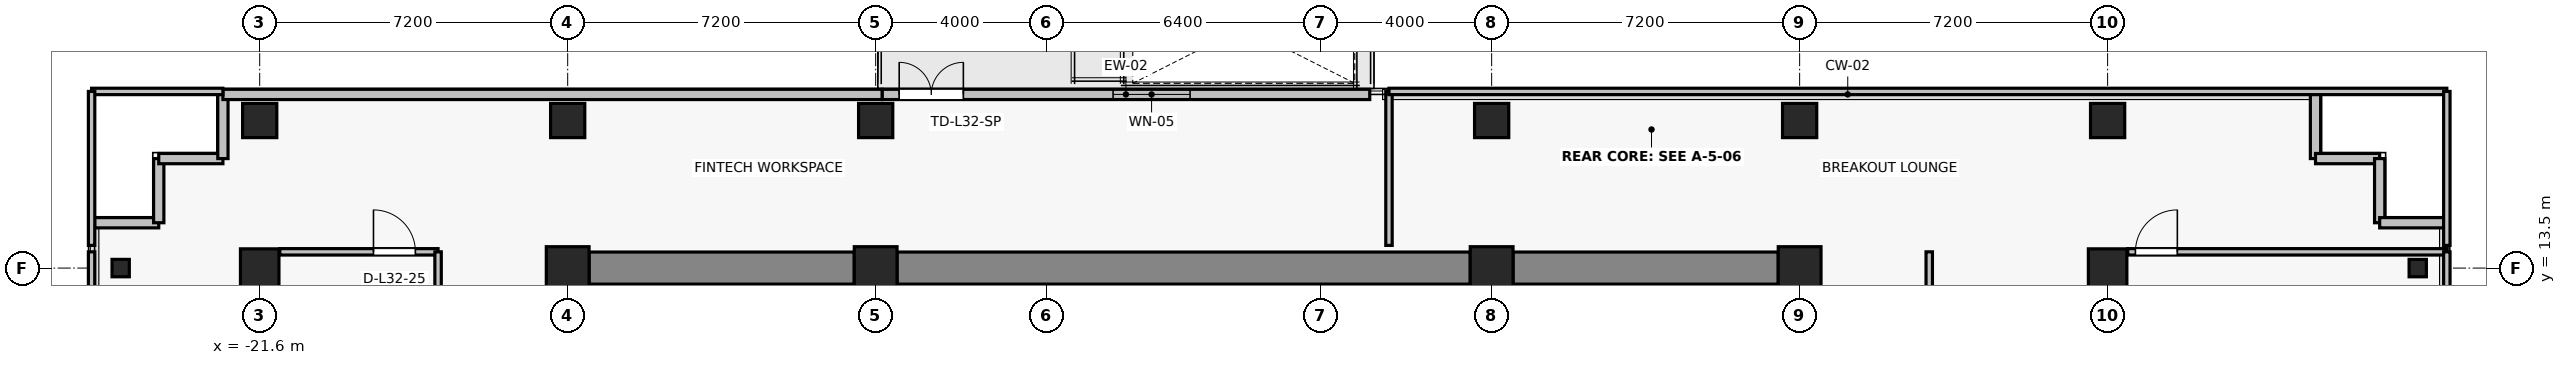
"""IFC4 building model, lengths in metres.
Left out: names, types, materials, properties, quantities, classifications, styles, units other than length and angle.
Written with IfcOpenShell. Run it as: python <this file> out.ifc"""

import sys

from ifc_helpers import new_model, si_unit, direction, frame, frame_2d, origin, origin_2d, place, context, subcontext, project, spatial, rectangle, i_section, extrude, source, transform, mapped, element, fill, save


model = new_model("IFC4")
c1 = context("Model", 3, precision=1e-05, world=origin(), true_north=direction((0.0, 1.0)))
c2 = subcontext(c1, "Body", "Model", "MODEL_VIEW")
j1 = project(units=[si_unit("LENGTHUNIT", "METRE"), si_unit("PLANEANGLEUNIT", "RADIAN")], contexts=[c1])
p1 = place(None, origin())
s1 = spatial("IfcSite", under=j1, at=p1, CompositionType="ELEMENT")
p2 = place(p1, origin())
s2 = spatial("IfcBuilding", under=s1, at=p2, CompositionType="ELEMENT")
p3 = place(p2, frame((0.0, 0.0, 116.5)))
s3 = spatial("IfcBuildingStorey", under=s2, at=p3, CompositionType="ELEMENT", Elevation=116.5)
for number, where, z_axis, x_axis in (
    (1, (-14.4, 13.5, 0.0), (0.0, 0.0, 1.0), (1.0, 0.0, 0.0)),
    (2, (-7.2, 13.5, 0.0), (0.0, 0.0, 1.0), (1.0, 0.0, 0.0)),
    (3, (7.2, 13.5, 0.0), (0.0, 0.0, 1.0), (1.0, 0.0, 0.0)),
    (4, (14.4, 13.5, 0.0), (0.0, 0.0, 1.0), (1.0, 0.0, 0.0)),
):
    element("IfcColumn", number, at=place(p3, frame(where, z_axis=z_axis, x_axis=x_axis)), inside=s3, PredefinedType="COLUMN", context=c2, shape_type="SweptSolid", body=[
        extrude(rectangle(XDim=1.0, YDim=1.0, at=origin_2d()), origin(), (0.0, 0.0, 1.0), 3.3),
    ])
for number, where, z_axis, x_axis in (
    (5, (-21.6, 13.5, 0.0), (0.0, 0.0, 1.0), (1.0, 0.0, 0.0)),
    (6, (21.6, 13.5, 0.0), (0.0, 0.0, 1.0), (1.0, 0.0, 0.0)),
):
    element("IfcColumn", number, at=place(p3, frame(where, z_axis=z_axis, x_axis=x_axis)), inside=s3, PredefinedType="COLUMN", context=c2, shape_type="SweptSolid", body=[
        extrude(rectangle(XDim=0.9, YDim=0.9, at=origin_2d()), origin(), (0.0, 0.0, 1.0), 3.3),
    ])
for number, where, z_axis, x_axis in (
    (7, (-14.4, 16.95, 0.0), (0.0, 0.0, 1.0), (1.0, 0.0, 0.0)),
    (8, (-7.2, 16.95, 0.0), (0.0, 0.0, 1.0), (1.0, 0.0, 0.0)),
    (9, (7.2, 16.95, 0.0), (0.0, 0.0, 1.0), (1.0, 0.0, 0.0)),
    (10, (14.4, 16.95, 0.0), (0.0, 0.0, 1.0), (1.0, 0.0, 0.0)),
    (11, (-21.6, 16.95, 0.0), (0.0, 0.0, 1.0), (1.0, 0.0, 0.0)),
    (12, (21.6, 16.95, 0.0), (0.0, 0.0, 1.0), (1.0, 0.0, 0.0)),
):
    element("IfcColumn", number, at=place(p3, frame(where, z_axis=z_axis, x_axis=x_axis)), inside=s3, PredefinedType="COLUMN", context=c2, shape_type="SweptSolid", body=[
        extrude(rectangle(XDim=0.8, YDim=0.8, at=origin_2d()), origin(), (0.0, 0.0, 1.0), 3.3),
    ])
for number, where, z_axis, x_axis in (
    (13, (-24.85, 13.5, 0.0), (0.0, 0.0, 1.0), (1.0, 0.0, 0.0)),
    (14, (28.85, 13.5, 0.0), (0.0, 0.0, 1.0), (1.0, 0.0, 0.0)),
):
    element("IfcColumn", number, at=place(p3, frame(where, z_axis=z_axis, x_axis=x_axis)), inside=s3, PredefinedType="COLUMN", context=c2, shape_type="SweptSolid", body=[
        extrude(i_section(OverallWidth=0.404, OverallDepth=0.407, WebThickness=0.022, FlangeThickness=0.032, FilletRadius=0.015, at=origin_2d()), origin(), (0.0, 0.0, 1.0), 3.3),
    ])
p4 = place(p3, frame((-13.9, 13.5, 0.0), z_axis=(0.0, 0.0, 1.0), x_axis=(1.0, 0.0, 0.0)))
e15 = element("IfcWall", 15, at=p4, inside=s3, PredefinedType="SHEAR", context=c2, shape_type="SweptSolid", body=[
    extrude(rectangle(XDim=6.2, YDim=0.75, at=frame_2d((3.1, 0.0))), origin(), (0.0, 0.0, 1.0), 3.075),
])
p5 = place(p3, frame((-6.7, 13.5, 0.0), z_axis=(0.0, 0.0, 1.0), x_axis=(1.0, 0.0, 0.0)))
e16 = element("IfcWall", 16, at=p5, inside=s3, PredefinedType="SHEAR", context=c2, shape_type="SweptSolid", body=[
    extrude(rectangle(XDim=13.4, YDim=0.75, at=frame_2d((6.7, 0.0))), origin(), (0.0, 0.0, 1.0), 3.075),
])
p6 = place(p3, frame((7.7, 13.5, 0.0), z_axis=(0.0, 0.0, 1.0), x_axis=(1.0, 0.0, 0.0)))
e17 = element("IfcWall", 17, at=p6, inside=s3, PredefinedType="SHEAR", context=c2, shape_type="SweptSolid", body=[
    extrude(rectangle(XDim=6.2, YDim=0.75, at=frame_2d((3.1, 0.0))), origin(), (0.0, 0.0, 1.0), 3.075),
])
p7 = place(p3, frame((-7.05, 17.56, 0.0), z_axis=(0.0, 0.0, 1.0), x_axis=(1.0, 0.0, 0.0)))
e18 = element("IfcWall", 18, at=p7, inside=s3, PredefinedType="SOLIDWALL", context=c2, shape_type="SweptSolid", body=[
    extrude(rectangle(XDim=11.4, YDim=0.24, at=frame_2d((5.7, 0.0))), origin(), (0.0, 0.0, 1.0), 3.075),
])
p8 = place(p7, frame((0.4, 0.0, 0.0)))
e19 = element("IfcOpeningElement", 19, at=p8, cuts=e18, PredefinedType="OPENING", context=c2, shape_type="SweptSolid", body=[
    extrude(rectangle(XDim=1.5, YDim=2.2, at=frame_2d((0.75, 1.1))), frame((0.0, 0.13, 0.0), z_axis=(0.0, -1.0, 0.0), x_axis=(1.0, 0.0, 0.0)), (0.0, 0.0, 1.0), 0.26),
])
p9 = place(p7, frame((5.4, 0.0, 0.85)))
e20 = element("IfcOpeningElement", 20, at=p9, cuts=e18, PredefinedType="OPENING", context=c2, shape_type="SweptSolid", body=[
    extrude(rectangle(XDim=1.8, YDim=1.6, at=frame_2d((0.9, 0.8))), frame((0.0, 0.13, 0.0), z_axis=(0.0, -1.0, 0.0), x_axis=(1.0, 0.0, 0.0)), (0.0, 0.0, 1.0), 0.26),
])
for number, where, z_axis, x_axis in (
    (21, (-23.96, 14.56, 0.0), (0.0, 0.0, 1.0), (-1.0, 0.0, 0.0)),
    (22, (-23.96, 16.06, 0.0), (0.0, 0.0, 1.0), (0.0, -1.0, 0.0)),
    (23, (-22.46, 16.06, 0.0), (0.0, 0.0, 1.0), (-1.0, 0.0, 0.0)),
):
    element("IfcWall", number, at=place(p3, frame(where, z_axis=z_axis, x_axis=x_axis)), inside=s3, PredefinedType="SOLIDWALL", context=c2, shape_type="SweptSolid", body=[
        extrude(rectangle(XDim=1.5, YDim=0.24, at=frame_2d((0.75, 0.0))), origin(), (0.0, 0.0, 1.0), 3.075),
    ])
p10 = place(p3, frame((-22.46, 17.56, 0.0), z_axis=(0.0, 0.0, 1.0), x_axis=(0.0, -1.0, 0.0)))
e24 = element("IfcWall", 24, at=p10, inside=s3, PredefinedType="SOLIDWALL", context=c2, shape_type="SweptSolid", body=[
    extrude(rectangle(XDim=1.5, YDim=0.24, at=frame_2d((0.75, 0.0))), origin(), (0.0, 0.0, 1.0), 2.565),
])
p11 = place(p3, frame((-7.05, 17.56, 0.0), z_axis=(0.0, 0.0, 1.0), x_axis=(-1.0, 0.0, 0.0)))
e25 = element("IfcWall", 25, at=p11, inside=s3, PredefinedType="SOLIDWALL", context=c2, shape_type="SweptSolid", body=[
    extrude(rectangle(XDim=15.41, YDim=0.24, at=frame_2d((7.705, 0.0))), origin(), (0.0, 0.0, 1.0), 3.075),
])
for number, where, z_axis, x_axis in (
    (26, (26.46, 16.06, 0.0), (0.0, 0.0, 1.0), (0.0, 1.0, 0.0)),
    (27, (27.96, 16.06, 0.0), (0.0, 0.0, 1.0), (-1.0, 0.0, 0.0)),
    (28, (27.96, 14.56, 0.0), (0.0, 0.0, 1.0), (0.0, 1.0, 0.0)),
    (29, (29.46, 14.56, 0.0), (0.0, 0.0, 1.0), (-1.0, 0.0, 0.0)),
):
    element("IfcWall", number, at=place(p3, frame(where, z_axis=z_axis, x_axis=x_axis)), inside=s3, PredefinedType="SOLIDWALL", context=c2, shape_type="SweptSolid", body=[
        extrude(rectangle(XDim=1.5, YDim=0.24, at=frame_2d((0.75, 0.0))), origin(), (0.0, 0.0, 1.0), 3.075),
    ])
p12 = place(p3, frame((-21.13, 13.88, 0.0), z_axis=(0.0, 0.0, 1.0), x_axis=(1.0, 0.0, 0.0)))
e30 = element("IfcWall", 30, at=p12, inside=s3, PredefinedType="PARTITIONING", context=c2, shape_type="SweptSolid", body=[
    extrude(rectangle(XDim=3.7, YDim=0.15, at=frame_2d((1.85, 0.0))), origin(), (0.0, 0.0, 1.0), 3.075),
])
p13 = place(p12, frame((2.19, 0.0, 0.0)))
e31 = element("IfcOpeningElement", 31, at=p13, cuts=e30, PredefinedType="OPENING", context=c2, shape_type="SweptSolid", body=[
    extrude(rectangle(XDim=0.98, YDim=2.15, at=frame_2d((0.49, 1.075))), frame((0.0, 0.085, 0.0), z_axis=(0.0, -1.0, 0.0), x_axis=(1.0, 0.0, 0.0)), (0.0, 0.0, 1.0), 0.17),
])
p14 = place(p3, frame((-25.53, 10.146, 0.0), z_axis=(0.0, 0.0, 1.0), x_axis=(0.0, 1.0, 0.0)))
e32 = element("IfcWall", 32, at=p14, inside=s3, PredefinedType="PARTITIONING", context=c2, shape_type="SweptSolid", body=[
    extrude(rectangle(XDim=3.734, YDim=0.15, at=frame_2d((1.867, 0.0))), origin(), (0.0, 0.0, 1.0), 3.075),
])
p15 = place(p3, frame((-17.43, 13.88, 0.0), z_axis=(0.0, 0.0, 1.0), x_axis=(0.0, -1.0, 0.0)))
e33 = element("IfcWall", 33, at=p15, inside=s3, PredefinedType="PARTITIONING", context=c2, shape_type="SweptSolid", body=[
    extrude(rectangle(XDim=3.734, YDim=0.15, at=frame_2d((1.867, 0.0))), origin(), (0.0, 0.0, 1.0), 2.515),
])
p16 = place(p15, frame((1.377, 0.0, 0.0)))
e34 = element("IfcOpeningElement", 34, at=p16, cuts=e33, PredefinedType="OPENING", context=c2, shape_type="SweptSolid", body=[
    extrude(rectangle(XDim=0.98, YDim=2.15, at=frame_2d((0.49, 1.075))), frame((0.0, 0.085, 0.0), z_axis=(0.0, -1.0, 0.0), x_axis=(1.0, 0.0, 0.0)), (0.0, 0.0, 1.0), 0.17),
])
p17 = place(p3, frame((22.07, 13.88, 0.0), z_axis=(0.0, 0.0, 1.0), x_axis=(1.0, 0.0, 0.0)))
e35 = element("IfcWall", 35, at=p17, inside=s3, PredefinedType="PARTITIONING", context=c2, shape_type="SweptSolid", body=[
    extrude(rectangle(XDim=7.46, YDim=0.15, at=frame_2d((3.73, 0.0))), origin(), (0.0, 0.0, 1.0), 3.075),
])
p18 = place(p17, frame((0.18, 0.0, 0.0)))
e36 = element("IfcOpeningElement", 36, at=p18, cuts=e35, PredefinedType="OPENING", context=c2, shape_type="SweptSolid", body=[
    extrude(rectangle(XDim=0.98, YDim=2.15, at=frame_2d((0.49, 1.075))), frame((0.0, 0.085, 0.0), z_axis=(0.0, -1.0, 0.0), x_axis=(1.0, 0.0, 0.0)), (0.0, 0.0, 1.0), 0.17),
])
p19 = place(p3, frame((17.43, 4.522, 0.0), z_axis=(0.0, 0.0, 1.0), x_axis=(0.0, 1.0, 0.0)))
e37 = element("IfcWall", 37, at=p19, inside=s3, PredefinedType="PARTITIONING", context=c2, shape_type="SweptSolid", body=[
    extrude(rectangle(XDim=9.358, YDim=0.15, at=frame_2d((4.679, 0.0))), origin(), (0.0, 0.0, 1.0), 2.515),
])
p20 = place(p19, frame((4.189, 0.0, 0.0)))
e38 = element("IfcOpeningElement", 38, at=p20, cuts=e37, PredefinedType="OPENING", context=c2, shape_type="SweptSolid", body=[
    extrude(rectangle(XDim=0.98, YDim=2.15, at=frame_2d((0.49, 1.075))), frame((0.0, 0.085, 0.0), z_axis=(0.0, -1.0, 0.0), x_axis=(1.0, 0.0, 0.0)), (0.0, 0.0, 1.0), 0.17),
])
p21 = place(p3, frame((29.53, 13.88, 0.0), z_axis=(0.0, 0.0, 1.0), x_axis=(0.0, -1.0, 0.0)))
e39 = element("IfcWall", 39, at=p21, inside=s3, PredefinedType="PARTITIONING", context=c2, shape_type="SweptSolid", body=[
    extrude(rectangle(XDim=9.358, YDim=0.15, at=frame_2d((4.679, 0.0))), origin(), (0.0, 0.0, 1.0), 3.075),
])
p22 = place(p3, frame((-25.53, 17.63, 0.0), z_axis=(0.0, 0.0, 1.0), x_axis=(1.0, 0.0, 0.0)))
e40 = element("IfcWall", 40, at=p22, inside=s3, PredefinedType="PARTITIONING", context=c2, shape_type="SweptSolid", body=[
    extrude(rectangle(XDim=3.07, YDim=0.15, at=frame_2d((1.535, 0.0))), origin(), (0.0, 0.0, 1.0), 3.075),
])
p23 = place(p3, frame((-25.53, 14.03, 0.0), z_axis=(0.0, 0.0, 1.0), x_axis=(0.0, 1.0, 0.0)))
e41 = element("IfcWall", 41, at=p23, inside=s3, PredefinedType="PARTITIONING", context=c2, shape_type="SweptSolid", body=[
    extrude(rectangle(XDim=3.6, YDim=0.15, at=frame_2d((1.8, 0.0))), origin(), (0.0, 0.0, 1.0), 3.075),
])
p24 = place(p3, frame((4.8, 17.63, 0.0), z_axis=(0.0, 0.0, 1.0), x_axis=(0.0, -1.0, 0.0)))
e42 = element("IfcWall", 42, at=p24, inside=s3, PredefinedType="PARTITIONING", context=c2, shape_type="SweptSolid", body=[
    extrude(rectangle(XDim=3.6, YDim=0.15, at=frame_2d((1.8, 0.0))), origin(), (0.0, 0.0, 1.0), 2.565),
])
p25 = place(p3, frame((4.8, 17.63, 0.0), z_axis=(0.0, 0.0, 1.0), x_axis=(1.0, 0.0, 0.0)))
e43 = element("IfcWall", 43, at=p25, inside=s3, PredefinedType="PARTITIONING", context=c2, shape_type="SweptSolid", body=[
    extrude(rectangle(XDim=24.73, YDim=0.15, at=frame_2d((12.365, 0.0))), origin(), (0.0, 0.0, 1.0), 3.075),
])
p26 = place(p3, frame((29.53, 17.63, 0.0), z_axis=(0.0, 0.0, 1.0), x_axis=(0.0, -1.0, 0.0)))
e44 = element("IfcWall", 44, at=p26, inside=s3, PredefinedType="PARTITIONING", context=c2, shape_type="SweptSolid", body=[
    extrude(rectangle(XDim=3.6, YDim=0.15, at=frame_2d((1.8, 0.0))), origin(), (0.0, 0.0, 1.0), 3.075),
])
m1 = source(origin(), c2, "Body", "SweptSolid", [
    extrude(rectangle(XDim=1.5, YDim=2.2, at=frame_2d((0.75, 1.1))), frame((0.0, 0.025, 0.0), z_axis=(0.0, -1.0, 0.0), x_axis=(1.0, 0.0, 0.0)), (0.0, 0.0, 1.0), 0.05),
])
p27 = place(p8, origin())
e45 = element("IfcDoor", 45, at=p27, inside=s3, OperationType="DOUBLE_DOOR_SINGLE_SWING", PredefinedType="DOOR", context=c2, shape_type="MappedRepresentation", body=[
    mapped(m1, transform((0.0, 0.0, 0.0), x_axis=(1.0, 0.0, 0.0), y_axis=(0.0, 1.0, 0.0), z_axis=(0.0, 0.0, 1.0), scale=1.0)),
])
fill(e19, e45)
m2 = source(origin(), c2, "Body", "SweptSolid", [
    extrude(rectangle(XDim=1.8, YDim=1.6, at=frame_2d((0.9, 0.8))), frame((0.0, 0.03, 0.0), z_axis=(0.0, -1.0, 0.0), x_axis=(1.0, 0.0, 0.0)), (0.0, 0.0, 1.0), 0.06),
])
p28 = place(p9, origin())
e46 = element("IfcWindow", 46, at=p28, inside=s3, PartitioningType="SINGLE_PANEL", PredefinedType="WINDOW", context=c2, shape_type="MappedRepresentation", body=[
    mapped(m2, transform((0.0, 0.0, 0.0), x_axis=(1.0, 0.0, 0.0), y_axis=(0.0, 1.0, 0.0), z_axis=(0.0, 0.0, 1.0), scale=1.0)),
])
fill(e20, e46)
m3 = source(origin(), c2, "Body", "SweptSolid", [
    extrude(rectangle(XDim=0.98, YDim=2.15, at=frame_2d((0.49, 1.075))), frame((0.0, 0.025, 0.0), z_axis=(0.0, -1.0, 0.0), x_axis=(1.0, 0.0, 0.0)), (0.0, 0.0, 1.0), 0.05),
])
p29 = place(p13, origin())
e47 = element("IfcDoor", 47, at=p29, inside=s3, OperationType="SINGLE_SWING_LEFT", PredefinedType="DOOR", context=c2, shape_type="MappedRepresentation", body=[
    mapped(m3, transform((0.0, 0.0, 0.0), x_axis=(1.0, 0.0, 0.0), y_axis=(0.0, 1.0, 0.0), z_axis=(0.0, 0.0, 1.0), scale=1.0)),
])
fill(e31, e47)
p30 = place(p18, origin())
e48 = element("IfcDoor", 48, at=p30, inside=s3, OperationType="SINGLE_SWING_RIGHT", PredefinedType="DOOR", context=c2, shape_type="MappedRepresentation", body=[
    mapped(m3, transform((0.0, 0.0, 0.0), x_axis=(1.0, 0.0, 0.0), y_axis=(0.0, 1.0, 0.0), z_axis=(0.0, 0.0, 1.0), scale=1.0)),
])
fill(e36, e48)
save(model, sys.argv[1])
